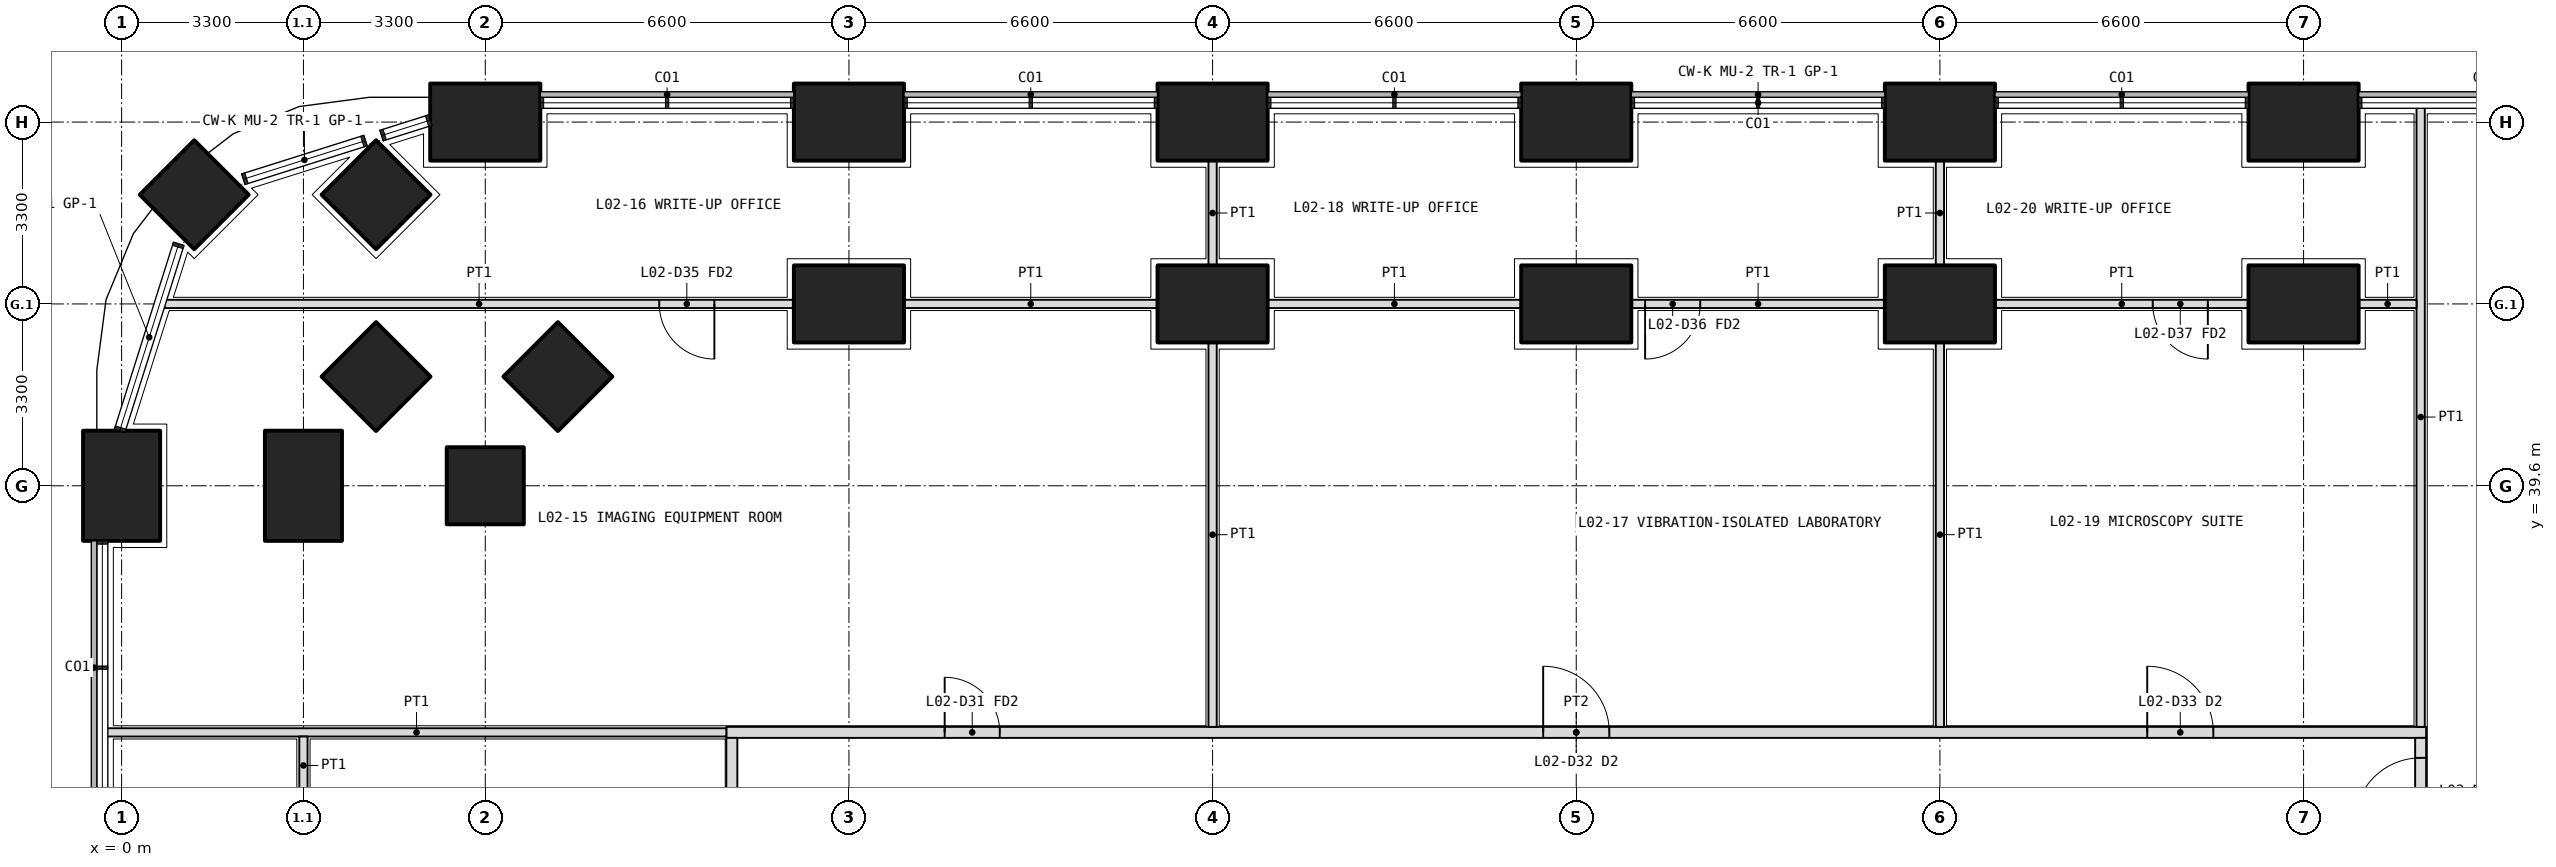
"""IFC4 building model, lengths in metres.
Left out: names, types, materials, properties, quantities, classifications, styles, units other than length and angle.
Written with IfcOpenShell. Run it as: python <this file> out.ifc"""

import sys

from ifc_helpers import new_model, si_unit, direction, frame, frame_2d, origin, origin_2d, place, context, subcontext, project, spatial, rectangle, extrude, element, fill, save


model = new_model("IFC4")
c1 = context("Model", 3, precision=1e-05, world=origin(), true_north=direction((0.0, 1.0)))
c2 = subcontext(c1, "Body", "Model", "MODEL_VIEW")
j1 = project(units=[si_unit("LENGTHUNIT", "METRE"), si_unit("PLANEANGLEUNIT", "RADIAN")], contexts=[c1])
p1 = place(None, origin())
s1 = spatial("IfcSite", under=j1, at=p1, CompositionType="ELEMENT")
p2 = place(p1, origin())
s2 = spatial("IfcBuilding", under=s1, at=p2, CompositionType="ELEMENT")
p3 = place(p2, frame((0.0, 0.0, 12.6)))
s3 = spatial("IfcBuildingStorey", under=s2, at=p3, CompositionType="ELEMENT", Elevation=12.6)
p4 = place(p3, frame((1.318, 44.882, 0.0), z_axis=(0.0, 0.0, 1.0), x_axis=(0.707106781187, 0.707106781187, 0.0)))
e1 = element("IfcColumn", 1, at=p4, inside=s3, PredefinedType="COLUMN", context=c2, shape_type="SweptSolid", body=[
    extrude(rectangle(XDim=1.4, YDim=1.4, at=origin_2d()), origin(), (0.0, 0.0, 1.0), 4.5),
])
for number, where, z_axis, x_axis in (
    (2, (0.0, 39.6, 0.0), (0.0, 0.0, 1.0), (0.0, 1.0, 0.0)),
    (3, (6.6, 46.2, 0.0), (0.0, 0.0, 1.0), (1.0, 0.0, 0.0)),
    (4, (13.2, 46.2, 0.0), (0.0, 0.0, 1.0), (1.0, 0.0, 0.0)),
    (5, (19.8, 46.2, 0.0), (0.0, 0.0, 1.0), (1.0, 0.0, 0.0)),
    (6, (26.4, 46.2, 0.0), (0.0, 0.0, 1.0), (1.0, 0.0, 0.0)),
    (7, (33.0, 46.2, 0.0), (0.0, 0.0, 1.0), (1.0, 0.0, 0.0)),
    (8, (39.6, 46.2, 0.0), (0.0, 0.0, 1.0), (1.0, 0.0, 0.0)),
):
    element("IfcColumn", number, at=place(p3, frame(where, z_axis=z_axis, x_axis=x_axis)), inside=s3, PredefinedType="COLUMN", context=c2, shape_type="SweptSolid", body=[
        extrude(rectangle(XDim=2.0, YDim=1.4, at=origin_2d()), origin(), (0.0, 0.0, 1.0), 4.5),
    ])
for number, where, z_axis, x_axis in (
    (9, (6.6, 39.6, 0.0), (0.0, 0.0, 1.0), (1.0, 0.0, 0.0)),
    (10, (4.618, 44.882, 0.0), (0.0, 0.0, 1.0), (0.707, 0.707, 0.0)),
):
    element("IfcColumn", number, at=place(p3, frame(where, z_axis=z_axis, x_axis=x_axis)), inside=s3, PredefinedType="COLUMN", context=c2, shape_type="SweptSolid", body=[
        extrude(rectangle(XDim=1.4, YDim=1.4, at=origin_2d()), origin(), (0.0, 0.0, 1.0), 4.5),
    ])
p5 = place(p3, frame((3.3, 39.6, 0.0), z_axis=(0.0, 0.0, 1.0), x_axis=(0.0, 1.0, 0.0)))
e11 = element("IfcColumn", 11, at=p5, inside=s3, PredefinedType="COLUMN", context=c2, shape_type="SweptSolid", body=[
    extrude(rectangle(XDim=2.0, YDim=1.4, at=origin_2d()), origin(), (0.0, 0.0, 1.0), 4.5),
])
p6 = place(p3, frame((4.618, 41.582, 0.0), z_axis=(0.0, 0.0, 1.0), x_axis=(0.707106781187, 0.707106781187, 0.0)))
e12 = element("IfcColumn", 12, at=p6, inside=s3, PredefinedType="COLUMN", context=c2, shape_type="SweptSolid", body=[
    extrude(rectangle(XDim=1.4, YDim=1.4, at=origin_2d()), origin(), (0.0, 0.0, 1.0), 4.5),
])
for number, where, z_axis, x_axis in (
    (13, (13.2, 42.9, 0.0), (0.0, 0.0, 1.0), (1.0, 0.0, 0.0)),
    (14, (19.8, 42.9, 0.0), (0.0, 0.0, 1.0), (1.0, 0.0, 0.0)),
    (15, (26.4, 42.9, 0.0), (0.0, 0.0, 1.0), (1.0, 0.0, 0.0)),
    (16, (33.0, 42.9, 0.0), (0.0, 0.0, 1.0), (1.0, 0.0, 0.0)),
    (17, (39.6, 42.9, 0.0), (0.0, 0.0, 1.0), (1.0, 0.0, 0.0)),
):
    element("IfcColumn", number, at=place(p3, frame(where, z_axis=z_axis, x_axis=x_axis)), inside=s3, PredefinedType="COLUMN", context=c2, shape_type="SweptSolid", body=[
        extrude(rectangle(XDim=2.0, YDim=1.4, at=origin_2d()), origin(), (0.0, 0.0, 1.0), 4.5),
    ])
p7 = place(p3, frame((7.918, 41.582, 0.0), z_axis=(0.0, 0.0, 1.0), x_axis=(0.707106781187, 0.707106781187, 0.0)))
e18 = element("IfcColumn", 18, at=p7, inside=s3, PredefinedType="COLUMN", context=c2, shape_type="SweptSolid", body=[
    extrude(rectangle(XDim=1.4, YDim=1.4, at=origin_2d()), origin(), (0.0, 0.0, 1.0), 4.5),
])
p8 = place(p3, frame((10.975, 35.125, 0.0), z_axis=(0.0, 0.0, 1.0), x_axis=(1.0, 0.0, 0.0)))
e19 = element("IfcWall", 19, at=p8, inside=s3, PredefinedType="PARTITIONING", context=c2, shape_type="SweptSolid", body=[
    extrude(rectangle(XDim=30.85, YDim=0.2, at=frame_2d((15.425, 0.0))), origin(), (0.0, 0.0, 1.0), 3.15),
])
p9 = place(p8, frame((3.962, 0.0, 0.0)))
e20 = element("IfcOpeningElement", 20, at=p9, cuts=e19, PredefinedType="OPENING", context=c2, shape_type="SweptSolid", body=[
    extrude(rectangle(XDim=1.0, YDim=2.1, at=frame_2d((0.5, 1.05))), frame((0.0, 0.11, 0.0), z_axis=(0.0, -1.0, 0.0), x_axis=(1.0, 0.0, 0.0)), (0.0, 0.0, 1.0), 0.22),
])
p10 = place(p8, frame((14.825, 0.0, 0.0)))
e21 = element("IfcOpeningElement", 21, at=p10, cuts=e19, PredefinedType="OPENING", context=c2, shape_type="SweptSolid", body=[
    extrude(rectangle(XDim=1.2, YDim=2.1, at=frame_2d((0.6, 1.05))), frame((0.0, 0.11, 0.0), z_axis=(0.0, -1.0, 0.0), x_axis=(1.0, 0.0, 0.0)), (0.0, 0.0, 1.0), 0.22),
])
p11 = place(p8, frame((25.788, 0.0, 0.0)))
e22 = element("IfcOpeningElement", 22, at=p11, cuts=e19, PredefinedType="OPENING", context=c2, shape_type="SweptSolid", body=[
    extrude(rectangle(XDim=1.2, YDim=2.1, at=frame_2d((0.6, 1.05))), frame((0.0, 0.11, 0.0), z_axis=(0.0, -1.0, 0.0), x_axis=(1.0, 0.0, 0.0)), (0.0, 0.0, 1.0), 0.22),
])
p12 = place(p3, frame((11.075, 11.175, 0.0), z_axis=(0.0, 0.0, 1.0), x_axis=(0.0, 1.0, 0.0)))
e23 = element("IfcWall", 23, at=p12, inside=s3, PredefinedType="PARTITIONING", context=c2, shape_type="SweptSolid", body=[
    extrude(rectangle(XDim=23.85, YDim=0.2, at=frame_2d((11.925, 0.0))), origin(), (0.0, 0.0, 1.0), 3.15),
])
p13 = place(p12, frame((0.363, 0.0, 0.0)))
e24 = element("IfcOpeningElement", 24, at=p13, cuts=e23, PredefinedType="OPENING", context=c2, shape_type="SweptSolid", body=[
    extrude(rectangle(XDim=1.2, YDim=2.1, at=frame_2d((0.6, 1.05))), frame((0.0, 0.11, 0.0), z_axis=(0.0, -1.0, 0.0), x_axis=(1.0, 0.0, 0.0)), (0.0, 0.0, 1.0), 0.22),
])
p14 = place(p12, frame((2.575, 0.0, 0.0)))
e25 = element("IfcOpeningElement", 25, at=p14, cuts=e23, PredefinedType="OPENING", context=c2, shape_type="SweptSolid", body=[
    extrude(rectangle(XDim=1.0, YDim=2.1, at=frame_2d((0.5, 1.05))), frame((0.0, 0.11, 0.0), z_axis=(0.0, -1.0, 0.0), x_axis=(1.0, 0.0, 0.0)), (0.0, 0.0, 1.0), 0.22),
])
p15 = place(p12, frame((5.625, 0.0, 0.0)))
e26 = element("IfcOpeningElement", 26, at=p15, cuts=e23, PredefinedType="OPENING", context=c2, shape_type="SweptSolid", body=[
    extrude(rectangle(XDim=0.9, YDim=2.1, at=frame_2d((0.45, 1.05))), frame((0.0, 0.11, 0.0), z_axis=(0.0, -1.0, 0.0), x_axis=(1.0, 0.0, 0.0)), (0.0, 0.0, 1.0), 0.22),
])
p16 = place(p12, frame((9.425, 0.0, 0.0)))
e27 = element("IfcOpeningElement", 27, at=p16, cuts=e23, PredefinedType="OPENING", context=c2, shape_type="SweptSolid", body=[
    extrude(rectangle(XDim=0.9, YDim=2.1, at=frame_2d((0.45, 1.05))), frame((0.0, 0.11, 0.0), z_axis=(0.0, -1.0, 0.0), x_axis=(1.0, 0.0, 0.0)), (0.0, 0.0, 1.0), 0.22),
])
p17 = place(p12, frame((12.975, 0.0, 0.0)))
e28 = element("IfcOpeningElement", 28, at=p17, cuts=e23, PredefinedType="OPENING", context=c2, shape_type="SweptSolid", body=[
    extrude(rectangle(XDim=1.0, YDim=2.1, at=frame_2d((0.5, 1.05))), frame((0.0, 0.11, 0.0), z_axis=(0.0, -1.0, 0.0), x_axis=(1.0, 0.0, 0.0)), (0.0, 0.0, 1.0), 0.22),
])
p18 = place(p12, frame((18.988, 0.0, 0.0)))
e29 = element("IfcOpeningElement", 29, at=p18, cuts=e23, PredefinedType="OPENING", context=c2, shape_type="SweptSolid", body=[
    extrude(rectangle(XDim=1.2, YDim=2.1, at=frame_2d((0.6, 1.05))), frame((0.0, 0.11, 0.0), z_axis=(0.0, -1.0, 0.0), x_axis=(1.0, 0.0, 0.0)), (0.0, 0.0, 1.0), 0.22),
])
p19 = place(p3, frame((41.725, 11.175, 0.0), z_axis=(0.0, 0.0, 1.0), x_axis=(0.0, 1.0, 0.0)))
e30 = element("IfcWall", 30, at=p19, inside=s3, PredefinedType="PARTITIONING", context=c2, shape_type="SweptSolid", body=[
    extrude(rectangle(XDim=23.85, YDim=0.2, at=frame_2d((11.925, 0.0))), origin(), (0.0, 0.0, 1.0), 3.15),
])
p20 = place(p19, frame((3.663, 0.0, 0.0)))
e31 = element("IfcOpeningElement", 31, at=p20, cuts=e30, PredefinedType="OPENING", context=c2, shape_type="SweptSolid", body=[
    extrude(rectangle(XDim=1.2, YDim=2.1, at=frame_2d((0.6, 1.05))), frame((0.0, 0.11, 0.0), z_axis=(0.0, -1.0, 0.0), x_axis=(1.0, 0.0, 0.0)), (0.0, 0.0, 1.0), 0.22),
])
p21 = place(p19, frame((9.625, 0.0, 0.0)))
e32 = element("IfcOpeningElement", 32, at=p21, cuts=e30, PredefinedType="OPENING", context=c2, shape_type="SweptSolid", body=[
    extrude(rectangle(XDim=1.0, YDim=2.1, at=frame_2d((0.5, 1.05))), frame((0.0, 0.11, 0.0), z_axis=(0.0, -1.0, 0.0), x_axis=(1.0, 0.0, 0.0)), (0.0, 0.0, 1.0), 0.22),
])
p22 = place(p19, frame((12.975, 0.0, 0.0)))
e33 = element("IfcOpeningElement", 33, at=p22, cuts=e30, PredefinedType="OPENING", context=c2, shape_type="SweptSolid", body=[
    extrude(rectangle(XDim=0.9, YDim=2.1, at=frame_2d((0.45, 1.05))), frame((0.0, 0.11, 0.0), z_axis=(0.0, -1.0, 0.0), x_axis=(1.0, 0.0, 0.0)), (0.0, 0.0, 1.0), 0.22),
])
p23 = place(p19, frame((18.025, 0.0, 0.0)))
e34 = element("IfcOpeningElement", 34, at=p23, cuts=e30, PredefinedType="OPENING", context=c2, shape_type="SweptSolid", body=[
    extrude(rectangle(XDim=1.0, YDim=2.1, at=frame_2d((0.5, 1.05))), frame((0.0, 0.11, 0.0), z_axis=(0.0, -1.0, 0.0), x_axis=(1.0, 0.0, 0.0)), (0.0, 0.0, 1.0), 0.22),
])
p24 = place(p19, frame((22.288, 0.0, 0.0)))
e35 = element("IfcOpeningElement", 35, at=p24, cuts=e30, PredefinedType="OPENING", context=c2, shape_type="SweptSolid", body=[
    extrude(rectangle(XDim=1.2, YDim=2.1, at=frame_2d((0.6, 1.05))), frame((0.0, 0.11, 0.0), z_axis=(0.0, -1.0, 0.0), x_axis=(1.0, 0.0, 0.0)), (0.0, 0.0, 1.0), 0.22),
])
p25 = place(p3, frame((41.725, 46.47, 0.0), z_axis=(0.0, 0.0, 1.0), x_axis=(0.0, -1.0, 0.0)))
e36 = element("IfcWall", 36, at=p25, inside=s3, PredefinedType="PARTITIONING", context=c2, shape_type="SweptSolid", body=[
    extrude(rectangle(XDim=11.245, YDim=0.15, at=frame_2d((5.623, 0.0))), origin(), (0.0, 0.0, 1.0), 3.0),
])
p26 = place(p3, frame((-0.27, 35.125, 0.0), z_axis=(0.0, 0.0, 1.0), x_axis=(1.0, 0.0, 0.0)))
e37 = element("IfcWall", 37, at=p26, inside=s3, PredefinedType="PARTITIONING", context=c2, shape_type="SweptSolid", body=[
    extrude(rectangle(XDim=11.245, YDim=0.15, at=frame_2d((5.623, 0.0))), origin(), (0.0, 0.0, 1.0), 3.0),
])
p27 = place(p3, frame((41.65, 42.9, 0.0), z_axis=(0.0, 0.0, 1.0), x_axis=(-1.0, 0.0, 0.0)))
e38 = element("IfcWall", 38, at=p27, inside=s3, PredefinedType="PARTITIONING", context=c2, shape_type="SweptSolid", body=[
    extrude(rectangle(XDim=1.05, YDim=0.15, at=frame_2d((0.525, 0.0))), origin(), (0.0, 0.0, 1.0), 4.2),
])
p28 = place(p3, frame((38.6, 42.9, 0.0), z_axis=(0.0, 0.0, 1.0), x_axis=(-1.0, 0.0, 0.0)))
e39 = element("IfcWall", 39, at=p28, inside=s3, PredefinedType="PARTITIONING", context=c2, shape_type="SweptSolid", body=[
    extrude(rectangle(XDim=4.6, YDim=0.15, at=frame_2d((2.3, 0.0))), origin(), (0.0, 0.0, 1.0), 4.2),
])
p29 = place(p28, frame((0.738, 0.0, 0.0)))
e40 = element("IfcOpeningElement", 40, at=p29, cuts=e39, PredefinedType="OPENING", context=c2, shape_type="SweptSolid", body=[
    extrude(rectangle(XDim=1.0, YDim=2.1, at=frame_2d((0.5, 1.05))), frame((0.0, 0.085, 0.0), z_axis=(0.0, -1.0, 0.0), x_axis=(1.0, 0.0, 0.0)), (0.0, 0.0, 1.0), 0.17),
])
p30 = place(p3, frame((32.0, 42.9, 0.0), z_axis=(0.0, 0.0, 1.0), x_axis=(-1.0, 0.0, 0.0)))
e41 = element("IfcWall", 41, at=p30, inside=s3, PredefinedType="PARTITIONING", context=c2, shape_type="SweptSolid", body=[
    extrude(rectangle(XDim=4.6, YDim=0.15, at=frame_2d((2.3, 0.0))), origin(), (0.0, 0.0, 1.0), 4.2),
])
p31 = place(p30, frame((3.35, 0.0, 0.0)))
e42 = element("IfcOpeningElement", 42, at=p31, cuts=e41, PredefinedType="OPENING", context=c2, shape_type="SweptSolid", body=[
    extrude(rectangle(XDim=1.0, YDim=2.1, at=frame_2d((0.5, 1.05))), frame((0.0, 0.085, 0.0), z_axis=(0.0, -1.0, 0.0), x_axis=(1.0, 0.0, 0.0)), (0.0, 0.0, 1.0), 0.17),
])
p32 = place(p3, frame((25.4, 42.9, 0.0), z_axis=(0.0, 0.0, 1.0), x_axis=(-1.0, 0.0, 0.0)))
e43 = element("IfcWall", 43, at=p32, inside=s3, PredefinedType="PARTITIONING", context=c2, shape_type="SweptSolid", body=[
    extrude(rectangle(XDim=4.6, YDim=0.15, at=frame_2d((2.3, 0.0))), origin(), (0.0, 0.0, 1.0), 4.2),
])
p33 = place(p3, frame((18.8, 42.9, 0.0), z_axis=(0.0, 0.0, 1.0), x_axis=(-1.0, 0.0, 0.0)))
e44 = element("IfcWall", 44, at=p33, inside=s3, PredefinedType="PARTITIONING", context=c2, shape_type="SweptSolid", body=[
    extrude(rectangle(XDim=4.6, YDim=0.15, at=frame_2d((2.3, 0.0))), origin(), (0.0, 0.0, 1.0), 4.2),
])
p34 = place(p3, frame((12.2, 42.9, 0.0), z_axis=(0.0, 0.0, 1.0), x_axis=(-1.0, 0.0, 0.0)))
e45 = element("IfcWall", 45, at=p34, inside=s3, PredefinedType="PARTITIONING", context=c2, shape_type="SweptSolid", body=[
    extrude(rectangle(XDim=11.424, YDim=0.15, at=frame_2d((5.712, 0.0))), origin(), (0.0, 0.0, 1.0), 3.0),
])
p35 = place(p34, frame((1.442, 0.0, 0.0)))
e46 = element("IfcOpeningElement", 46, at=p35, cuts=e45, PredefinedType="OPENING", context=c2, shape_type="SweptSolid", body=[
    extrude(rectangle(XDim=1.0, YDim=2.1, at=frame_2d((0.5, 1.05))), frame((0.0, 0.085, 0.0), z_axis=(0.0, -1.0, 0.0), x_axis=(1.0, 0.0, 0.0)), (0.0, 0.0, 1.0), 0.17),
])
p36 = place(p3, frame((19.8, 45.5, 0.0), z_axis=(0.0, 0.0, 1.0), x_axis=(0.0, -1.0, 0.0)))
e47 = element("IfcWall", 47, at=p36, inside=s3, PredefinedType="PARTITIONING", context=c2, shape_type="SweptSolid", body=[
    extrude(rectangle(XDim=1.9, YDim=0.15, at=frame_2d((0.95, 0.0))), origin(), (0.0, 0.0, 1.0), 3.15),
])
p37 = place(p3, frame((19.8, 42.2, 0.0), z_axis=(0.0, 0.0, 1.0), x_axis=(0.0, -1.0, 0.0)))
e48 = element("IfcWall", 48, at=p37, inside=s3, PredefinedType="PARTITIONING", context=c2, shape_type="SweptSolid", body=[
    extrude(rectangle(XDim=6.975, YDim=0.15, at=frame_2d((3.487, 0.0))), origin(), (0.0, 0.0, 1.0), 3.15),
])
p38 = place(p3, frame((33.0, 45.5, 0.0), z_axis=(0.0, 0.0, 1.0), x_axis=(0.0, -1.0, 0.0)))
e49 = element("IfcWall", 49, at=p38, inside=s3, PredefinedType="PARTITIONING", context=c2, shape_type="SweptSolid", body=[
    extrude(rectangle(XDim=1.9, YDim=0.15, at=frame_2d((0.95, 0.0))), origin(), (0.0, 0.0, 1.0), 3.15),
])
p39 = place(p3, frame((33.0, 42.2, 0.0), z_axis=(0.0, 0.0, 1.0), x_axis=(0.0, -1.0, 0.0)))
e50 = element("IfcWall", 50, at=p39, inside=s3, PredefinedType="PARTITIONING", context=c2, shape_type="SweptSolid", body=[
    extrude(rectangle(XDim=6.975, YDim=0.15, at=frame_2d((3.487, 0.0))), origin(), (0.0, 0.0, 1.0), 3.15),
])
p40 = place(p3, frame((3.3, 35.05, 0.0), z_axis=(0.0, 0.0, 1.0), x_axis=(0.0, -1.0, 0.0)))
e51 = element("IfcWall", 51, at=p40, inside=s3, PredefinedType="PARTITIONING", context=c2, shape_type="SweptSolid", body=[
    extrude(rectangle(XDim=1.05, YDim=0.15, at=frame_2d((0.525, 0.0))), origin(), (0.0, 0.0, 1.0), 4.2),
])
p41 = place(p24, origin())
e52 = element("IfcDoor", 52, at=p41, inside=s3, OperationType="DOUBLE_DOOR_SINGLE_SWING", PredefinedType="DOOR", context=c2, shape_type="SweptSolid", body=[
    extrude(rectangle(XDim=1.2, YDim=2.1, at=frame_2d((0.6, 1.05))), frame((0.0, 0.025, 0.0), z_axis=(0.0, -1.0, 0.0), x_axis=(1.0, 0.0, 0.0)), (0.0, 0.0, 1.0), 0.05),
])
fill(e35, e52)
p42 = place(p9, origin())
e53 = element("IfcDoor", 53, at=p42, inside=s3, OperationType="SINGLE_SWING_LEFT", PredefinedType="DOOR", context=c2, shape_type="SweptSolid", body=[
    extrude(rectangle(XDim=1.0, YDim=2.1, at=frame_2d((0.5, 1.05))), frame((0.0, 0.025, 0.0), z_axis=(0.0, -1.0, 0.0), x_axis=(1.0, 0.0, 0.0)), (0.0, 0.0, 1.0), 0.05),
])
fill(e20, e53)
p43 = place(p35, origin())
e54 = element("IfcDoor", 54, at=p43, inside=s3, OperationType="SINGLE_SWING_LEFT", PredefinedType="DOOR", context=c2, shape_type="SweptSolid", body=[
    extrude(rectangle(XDim=1.0, YDim=2.1, at=frame_2d((0.5, 1.05))), frame((0.0, 0.025, 0.0), z_axis=(0.0, -1.0, 0.0), x_axis=(1.0, 0.0, 0.0)), (0.0, 0.0, 1.0), 0.05),
])
fill(e46, e54)
p44 = place(p10, origin())
e55 = element("IfcDoor", 55, at=p44, inside=s3, OperationType="DOUBLE_DOOR_SINGLE_SWING", PredefinedType="DOOR", context=c2, shape_type="SweptSolid", body=[
    extrude(rectangle(XDim=1.2, YDim=2.1, at=frame_2d((0.6, 1.05))), frame((0.0, 0.025, 0.0), z_axis=(0.0, -1.0, 0.0), x_axis=(1.0, 0.0, 0.0)), (0.0, 0.0, 1.0), 0.05),
])
fill(e21, e55)
p45 = place(p31, origin())
e56 = element("IfcDoor", 56, at=p45, inside=s3, OperationType="SINGLE_SWING_RIGHT", PredefinedType="DOOR", context=c2, shape_type="SweptSolid", body=[
    extrude(rectangle(XDim=1.0, YDim=2.1, at=frame_2d((0.5, 1.05))), frame((0.0, 0.025, 0.0), z_axis=(0.0, -1.0, 0.0), x_axis=(1.0, 0.0, 0.0)), (0.0, 0.0, 1.0), 0.05),
])
fill(e42, e56)
p46 = place(p11, origin())
e57 = element("IfcDoor", 57, at=p46, inside=s3, OperationType="DOUBLE_DOOR_SINGLE_SWING", PredefinedType="DOOR", context=c2, shape_type="SweptSolid", body=[
    extrude(rectangle(XDim=1.2, YDim=2.1, at=frame_2d((0.6, 1.05))), frame((0.0, 0.025, 0.0), z_axis=(0.0, -1.0, 0.0), x_axis=(1.0, 0.0, 0.0)), (0.0, 0.0, 1.0), 0.05),
])
fill(e22, e57)
p47 = place(p29, origin())
e58 = element("IfcDoor", 58, at=p47, inside=s3, OperationType="SINGLE_SWING_LEFT", PredefinedType="DOOR", context=c2, shape_type="SweptSolid", body=[
    extrude(rectangle(XDim=1.0, YDim=2.1, at=frame_2d((0.5, 1.05))), frame((0.0, 0.025, 0.0), z_axis=(0.0, -1.0, 0.0), x_axis=(1.0, 0.0, 0.0)), (0.0, 0.0, 1.0), 0.05),
])
fill(e40, e58)
save(model, sys.argv[1])
